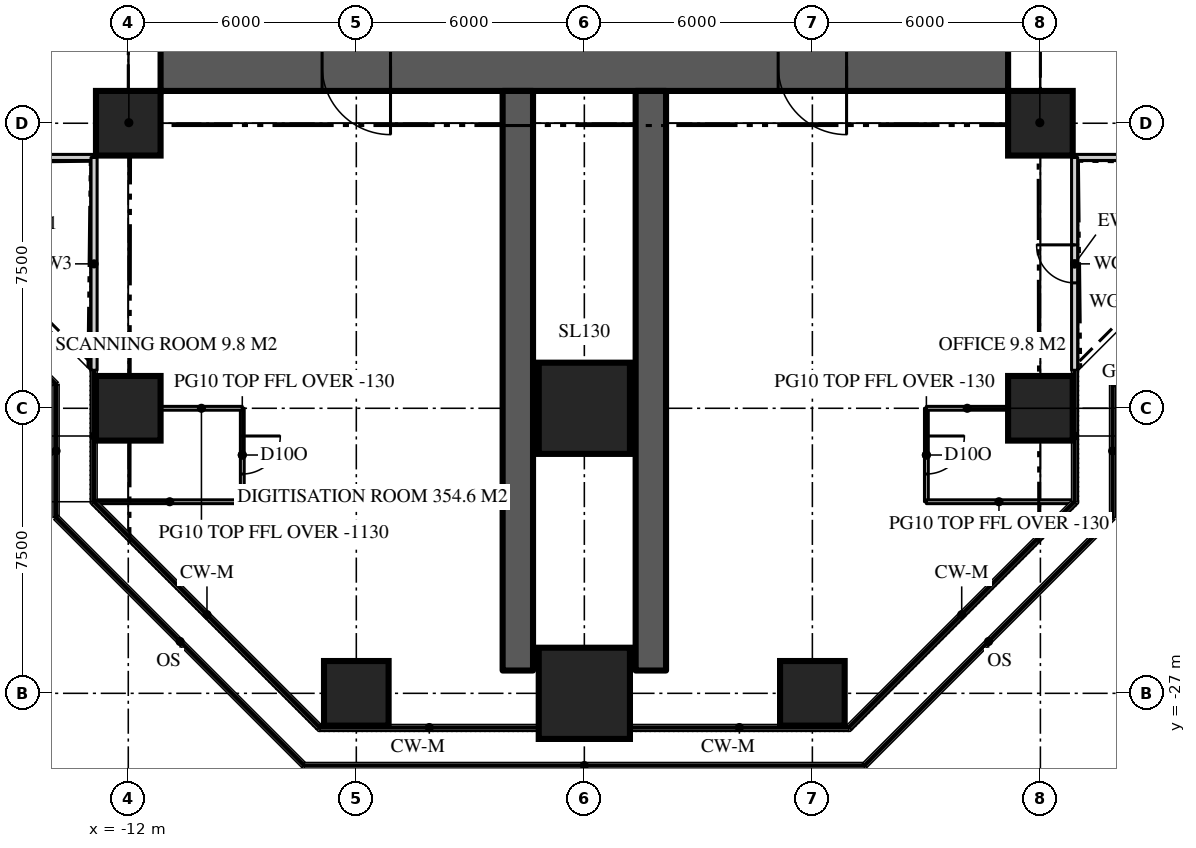
"""IFC4 building model, lengths in metres.
Left out: names, types, materials, properties, quantities, classifications, styles, units other than length and angle.
Written with IfcOpenShell. Run it as: python <this file> out.ifc"""

import sys

from ifc_helpers import new_model, si_unit, direction, frame, frame_2d, origin, origin_2d, place, context, subcontext, project, spatial, rectangle, extrude, element, fill, save


model = new_model("IFC4")
c1 = context("Model", 3, precision=1e-05, world=origin(), true_north=direction((0.0, 1.0)))
c2 = subcontext(c1, "Body", "Model", "MODEL_VIEW")
j1 = project(units=[si_unit("LENGTHUNIT", "METRE"), si_unit("PLANEANGLEUNIT", "RADIAN")], contexts=[c1])
p1 = place(None, origin())
s1 = spatial("IfcSite", under=j1, at=p1, CompositionType="ELEMENT")
p2 = place(p1, origin())
s2 = spatial("IfcBuilding", under=s1, at=p2, CompositionType="ELEMENT")
p3 = place(p2, frame((0.0, 0.0, 159.3)))
s3 = spatial("IfcBuildingStorey", under=s2, at=p3, CompositionType="ELEMENT", Elevation=159.3)
p4 = place(p3, frame((11.15, -10.5, 0.0), z_axis=(0.0, 0.0, 1.0), x_axis=(-1.0, 0.0, 0.0)))
e1 = element("IfcWall", 1, at=p4, inside=s3, PredefinedType="SHEAR", context=c2, shape_type="SweptSolid", body=[
    extrude(rectangle(XDim=22.3, YDim=1.3, at=frame_2d((11.15, 0.0))), origin(), (0.0, 0.0, 1.0), 3.9),
])
p5 = place(p4, frame((16.25, 0.0, 0.0)))
e2 = element("IfcOpeningElement", 2, at=p5, cuts=e1, PredefinedType="OPENING", context=c2, shape_type="SweptSolid", body=[
    extrude(rectangle(XDim=1.8, YDim=2.2, at=frame_2d((0.9, 1.1))), frame((0.0, 0.66, 0.0), z_axis=(0.0, -1.0, 0.0), x_axis=(1.0, 0.0, 0.0)), (0.0, 0.0, 1.0), 1.32),
])
p6 = place(p4, frame((4.25, 0.0, 0.0)))
e3 = element("IfcOpeningElement", 3, at=p6, cuts=e1, PredefinedType="OPENING", context=c2, shape_type="SweptSolid", body=[
    extrude(rectangle(XDim=1.8, YDim=2.2, at=frame_2d((0.9, 1.1))), frame((0.0, 0.66, 0.0), z_axis=(0.0, -1.0, 0.0), x_axis=(1.0, 0.0, 0.0)), (0.0, 0.0, 1.0), 1.32),
])
for number, where, z_axis, x_axis in (
    (4, (-1.75, -11.15, 0.0), (0.0, 0.0, 1.0), (0.0, -1.0, 0.0)),
    (5, (1.75, -11.15, 0.0), (0.0, 0.0, 1.0), (0.0, -1.0, 0.0)),
):
    element("IfcWall", number, at=place(p3, frame(where, z_axis=z_axis, x_axis=x_axis)), inside=s3, PredefinedType="SHEAR", context=c2, shape_type="SweptSolid", body=[
        extrude(rectangle(XDim=15.25, YDim=0.8, at=frame_2d((7.625, 0.0))), origin(), (0.0, 0.0, 1.0), 3.9),
    ])
p7 = place(p3, frame((-6.0, -27.0, 0.0), z_axis=(0.0, 0.0, 1.0), x_axis=(1.0, 0.0, 0.0)))
e6 = element("IfcColumn", 6, at=p7, inside=s3, PredefinedType="COLUMN", context=c2, shape_type="SweptSolid", body=[
    extrude(rectangle(XDim=1.7, YDim=1.7, at=origin_2d()), origin(), (0.0, 0.0, 1.0), 3.9),
])
p8 = place(p3, frame((0.0, -27.0, 0.0), z_axis=(0.0, 0.0, 1.0), x_axis=(1.0, 0.0, 0.0)))
e7 = element("IfcColumn", 7, at=p8, inside=s3, PredefinedType="COLUMN", context=c2, shape_type="SweptSolid", body=[
    extrude(rectangle(XDim=2.4, YDim=2.4, at=origin_2d()), origin(), (0.0, 0.0, 1.0), 3.9),
])
for number, where, z_axis, x_axis in (
    (8, (6.0, -27.0, 0.0), (0.0, 0.0, 1.0), (1.0, 0.0, 0.0)),
    (9, (-12.0, -19.5, 0.0), (0.0, 0.0, 1.0), (1.0, 0.0, 0.0)),
):
    element("IfcColumn", number, at=place(p3, frame(where, z_axis=z_axis, x_axis=x_axis)), inside=s3, PredefinedType="COLUMN", context=c2, shape_type="SweptSolid", body=[
        extrude(rectangle(XDim=1.7, YDim=1.7, at=origin_2d()), origin(), (0.0, 0.0, 1.0), 3.9),
    ])
p9 = place(p3, frame((0.0, -19.5, 0.0), z_axis=(0.0, 0.0, 1.0), x_axis=(1.0, 0.0, 0.0)))
e10 = element("IfcColumn", 10, at=p9, inside=s3, PredefinedType="COLUMN", context=c2, shape_type="SweptSolid", body=[
    extrude(rectangle(XDim=2.4, YDim=2.4, at=origin_2d()), origin(), (0.0, 0.0, 1.0), 3.9),
])
for number, where, z_axis, x_axis in (
    (11, (12.0, -19.5, 0.0), (0.0, 0.0, 1.0), (1.0, 0.0, 0.0)),
    (12, (-12.0, -12.0, 0.0), (0.0, 0.0, 1.0), (1.0, 0.0, 0.0)),
    (13, (12.0, -12.0, 0.0), (0.0, 0.0, 1.0), (1.0, 0.0, 0.0)),
):
    element("IfcColumn", number, at=place(p3, frame(where, z_axis=z_axis, x_axis=x_axis)), inside=s3, PredefinedType="COLUMN", context=c2, shape_type="SweptSolid", body=[
        extrude(rectangle(XDim=1.7, YDim=1.7, at=origin_2d()), origin(), (0.0, 0.0, 1.0), 3.9),
    ])
p10 = place(p3, frame((12.9, -12.9, 0.0), z_axis=(0.0, 0.0, 1.0), x_axis=(1.0, 0.0, 0.0)))
e14 = element("IfcWall", 14, at=p10, inside=s3, PredefinedType="SOLIDWALL", context=c2, shape_type="SweptSolid", body=[
    extrude(rectangle(XDim=5.6, YDim=0.16, at=frame_2d((2.8, 0.0))), origin(), (0.0, 0.0, 1.0), 3.77),
])
p11 = place(p3, frame((-18.5, -12.9, 0.0), z_axis=(0.0, 0.0, 1.0), x_axis=(1.0, 0.0, 0.0)))
e15 = element("IfcWall", 15, at=p11, inside=s3, PredefinedType="SOLIDWALL", context=c2, shape_type="SweptSolid", body=[
    extrude(rectangle(XDim=5.6, YDim=0.16, at=frame_2d((2.8, 0.0))), origin(), (0.0, 0.0, 1.0), 3.77),
])
p12 = place(p11, frame((2.3, 0.0, 0.0)))
e16 = element("IfcOpeningElement", 16, at=p12, cuts=e15, PredefinedType="OPENING", context=c2, shape_type="SweptSolid", body=[
    extrude(rectangle(XDim=1.0, YDim=2.2, at=frame_2d((0.5, 1.1))), frame((0.0, 0.09, 0.0), z_axis=(0.0, -1.0, 0.0), x_axis=(1.0, 0.0, 0.0)), (0.0, 0.0, 1.0), 0.18),
])
p13 = place(p3, frame((-12.9, -12.9, 0.0), z_axis=(0.0, 0.0, 1.0), x_axis=(0.0, -1.0, 0.0)))
e17 = element("IfcWall", 17, at=p13, inside=s3, PredefinedType="SOLIDWALL", context=c2, shape_type="SweptSolid", body=[
    extrude(rectangle(XDim=5.6, YDim=0.16, at=frame_2d((2.8, 0.0))), origin(), (0.0, 0.0, 1.0), 3.77),
])
p14 = place(p3, frame((12.9, -18.5, 0.0), z_axis=(0.0, 0.0, 1.0), x_axis=(0.0, 1.0, 0.0)))
e18 = element("IfcWall", 18, at=p14, inside=s3, PredefinedType="SOLIDWALL", context=c2, shape_type="SweptSolid", body=[
    extrude(rectangle(XDim=5.6, YDim=0.16, at=frame_2d((2.8, 0.0))), origin(), (0.0, 0.0, 1.0), 3.77),
])
p15 = place(p14, frame((2.3, 0.0, 0.0)))
e19 = element("IfcOpeningElement", 19, at=p15, cuts=e18, PredefinedType="OPENING", context=c2, shape_type="SweptSolid", body=[
    extrude(rectangle(XDim=1.0, YDim=2.2, at=frame_2d((0.5, 1.1))), frame((0.0, 0.09, 0.0), z_axis=(0.0, -1.0, 0.0), x_axis=(1.0, 0.0, 0.0)), (0.0, 0.0, 1.0), 0.18),
])
p16 = place(p3, frame((9.0, -19.5, 0.0), z_axis=(0.0, 0.0, 1.0), x_axis=(0.0, -1.0, 0.0)))
e20 = element("IfcWall", 20, at=p16, inside=s3, PredefinedType="PARTITIONING", context=c2, shape_type="SweptSolid", body=[
    extrude(rectangle(XDim=2.459, YDim=0.1, at=frame_2d((1.229, 0.0))), origin(), (0.0, 0.0, 1.0), 3.77),
])
p17 = place(p16, frame((0.729, 0.0, 0.0)))
e21 = element("IfcOpeningElement", 21, at=p17, cuts=e20, PredefinedType="OPENING", context=c2, shape_type="SweptSolid", body=[
    extrude(rectangle(XDim=1.0, YDim=2.2, at=frame_2d((0.5, 1.1))), frame((0.0, 0.06, 0.0), z_axis=(0.0, -1.0, 0.0), x_axis=(1.0, 0.0, 0.0)), (0.0, 0.0, 1.0), 0.12),
])
p18 = place(p3, frame((9.0, -19.5, 0.0), z_axis=(0.0, 0.0, 1.0), x_axis=(1.0, 0.0, 0.0)))
e22 = element("IfcWall", 22, at=p18, inside=s3, PredefinedType="PARTITIONING", context=c2, shape_type="SweptSolid", body=[
    extrude(rectangle(XDim=2.15, YDim=0.1, at=frame_2d((1.075, 0.0))), origin(), (0.0, 0.0, 1.0), 2.77),
])
p19 = place(p3, frame((9.0, -21.959, 0.0), z_axis=(0.0, 0.0, 1.0), x_axis=(1.0, 0.0, 0.0)))
e23 = element("IfcWall", 23, at=p19, inside=s3, PredefinedType="PARTITIONING", context=c2, shape_type="SweptSolid", body=[
    extrude(rectangle(XDim=3.82, YDim=0.1, at=frame_2d((1.91, 0.0))), origin(), (0.0, 0.0, 1.0), 3.77),
])
p20 = place(p3, frame((-9.0, -19.5, 0.0), z_axis=(0.0, 0.0, 1.0), x_axis=(0.0, -1.0, 0.0)))
e24 = element("IfcWall", 24, at=p20, inside=s3, PredefinedType="PARTITIONING", context=c2, shape_type="SweptSolid", body=[
    extrude(rectangle(XDim=2.459, YDim=0.1, at=frame_2d((1.229, 0.0))), origin(), (0.0, 0.0, 1.0), 3.77),
])
p21 = place(p20, frame((0.729, 0.0, 0.0)))
e25 = element("IfcOpeningElement", 25, at=p21, cuts=e24, PredefinedType="OPENING", context=c2, shape_type="SweptSolid", body=[
    extrude(rectangle(XDim=1.0, YDim=2.2, at=frame_2d((0.5, 1.1))), frame((0.0, 0.06, 0.0), z_axis=(0.0, -1.0, 0.0), x_axis=(1.0, 0.0, 0.0)), (0.0, 0.0, 1.0), 0.12),
])
p22 = place(p3, frame((-9.0, -19.5, 0.0), z_axis=(0.0, 0.0, 1.0), x_axis=(-1.0, 0.0, 0.0)))
e26 = element("IfcWall", 26, at=p22, inside=s3, PredefinedType="PARTITIONING", context=c2, shape_type="SweptSolid", body=[
    extrude(rectangle(XDim=2.15, YDim=0.1, at=frame_2d((1.075, 0.0))), origin(), (0.0, 0.0, 1.0), 2.77),
])
p23 = place(p3, frame((-9.0, -21.959, 0.0), z_axis=(0.0, 0.0, 1.0), x_axis=(-1.0, 0.0, 0.0)))
e27 = element("IfcWall", 27, at=p23, inside=s3, PredefinedType="PARTITIONING", context=c2, shape_type="SweptSolid", body=[
    extrude(rectangle(XDim=3.82, YDim=0.1, at=frame_2d((1.91, 0.0))), origin(), (0.0, 0.0, 1.0), 3.77),
])
for number, where, z_axis, x_axis in (
    (28, (-11.15, -11.15, 0.0), (0.0, 0.0, 1.0), (-0.707, -0.707, 0.0)),
    (29, (11.15, -11.15, 0.0), (0.0, 0.0, 1.0), (0.707, -0.707, 0.0)),
):
    element("IfcWall", number, at=place(p3, frame(where, z_axis=z_axis, x_axis=x_axis)), inside=s3, PredefinedType="PARTITIONING", context=c2, shape_type="SweptSolid", body=[
        extrude(rectangle(XDim=2.362, YDim=0.15, at=frame_2d((1.181, 0.0))), origin(), (0.0, 0.0, 1.0), 3.22),
    ])
p24 = place(p15, origin())
e30 = element("IfcDoor", 30, at=p24, inside=s3, OperationType="SINGLE_SWING_RIGHT", PredefinedType="DOOR", context=c2, shape_type="SweptSolid", body=[
    extrude(rectangle(XDim=1.0, YDim=2.2, at=frame_2d((0.5, 1.1))), frame((0.0, 0.025, 0.0), z_axis=(0.0, -1.0, 0.0), x_axis=(1.0, 0.0, 0.0)), (0.0, 0.0, 1.0), 0.05),
])
fill(e19, e30)
p25 = place(p5, origin())
e31 = element("IfcDoor", 31, at=p25, inside=s3, OperationType="DOUBLE_DOOR_DOUBLE_SWING", PredefinedType="DOOR", context=c2, shape_type="SweptSolid", body=[
    extrude(rectangle(XDim=1.8, YDim=2.2, at=frame_2d((0.9, 1.1))), frame((0.0, 0.025, 0.0), z_axis=(0.0, -1.0, 0.0), x_axis=(1.0, 0.0, 0.0)), (0.0, 0.0, 1.0), 0.05),
])
fill(e2, e31)
p26 = place(p6, origin())
e32 = element("IfcDoor", 32, at=p26, inside=s3, OperationType="DOUBLE_DOOR_DOUBLE_SWING", PredefinedType="DOOR", context=c2, shape_type="SweptSolid", body=[
    extrude(rectangle(XDim=1.8, YDim=2.2, at=frame_2d((0.9, 1.1))), frame((0.0, 0.025, 0.0), z_axis=(0.0, -1.0, 0.0), x_axis=(1.0, 0.0, 0.0)), (0.0, 0.0, 1.0), 0.05),
])
fill(e3, e32)
p27 = place(p17, origin())
e33 = element("IfcDoor", 33, at=p27, inside=s3, OperationType="SINGLE_SWING_LEFT", PredefinedType="DOOR", context=c2, shape_type="SweptSolid", body=[
    extrude(rectangle(XDim=1.0, YDim=2.2, at=frame_2d((0.5, 1.1))), frame((0.0, 0.025, 0.0), z_axis=(0.0, -1.0, 0.0), x_axis=(1.0, 0.0, 0.0)), (0.0, 0.0, 1.0), 0.05),
])
fill(e21, e33)
p28 = place(p21, origin())
e34 = element("IfcDoor", 34, at=p28, inside=s3, OperationType="SINGLE_SWING_LEFT", PredefinedType="DOOR", context=c2, shape_type="SweptSolid", body=[
    extrude(rectangle(XDim=1.0, YDim=2.2, at=frame_2d((0.5, 1.1))), frame((0.0, 0.025, 0.0), z_axis=(0.0, -1.0, 0.0), x_axis=(1.0, 0.0, 0.0)), (0.0, 0.0, 1.0), 0.05),
])
fill(e25, e34)
save(model, sys.argv[1])
